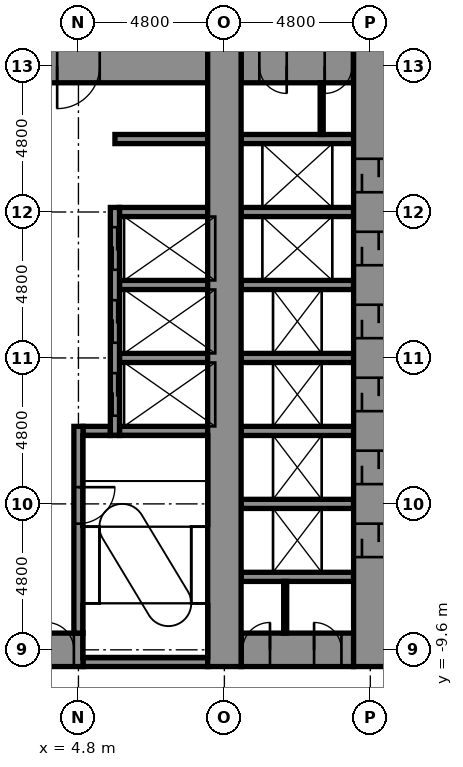
"""IFC4 building model, lengths in metres.
Left out: names, types, materials, properties, quantities, classifications, styles, units other than length and angle.
Written with IfcOpenShell. Run it as: python <this file> out.ifc"""

import sys

from ifc_helpers import new_model, si_unit, direction, frame, frame_2d, origin, place, context, subcontext, project, spatial, rectangle, extrude, element, fill, save


model = new_model("IFC4")
c1 = context("Model", 3, precision=1e-05, world=origin(), true_north=direction((0.0, 1.0)))
c2 = subcontext(c1, "Body", "Model", "MODEL_VIEW")
j1 = project(units=[si_unit("LENGTHUNIT", "METRE"), si_unit("PLANEANGLEUNIT", "RADIAN")], contexts=[c1])
p1 = place(None, origin())
s1 = spatial("IfcSite", under=j1, at=p1, CompositionType="ELEMENT")
p2 = place(p1, origin())
s2 = spatial("IfcBuilding", under=s1, at=p2, CompositionType="ELEMENT")
p3 = place(p2, origin())
s3 = spatial("IfcBuildingStorey", under=s2, at=p3, CompositionType="ELEMENT", Elevation=0.0)
p4 = place(p3, frame((4.95, -10.0, -0.4), z_axis=(0.0, 0.0, 1.0), x_axis=(1.0, 0.0, 0.0)))
e1 = element("IfcWall", 1, at=p4, inside=s3, PredefinedType="STANDARD", context=c2, shape_type="SweptSolid", body=[
    extrude(rectangle(XDim=4.1, YDim=0.3, at=frame_2d((2.05, 0.0))), origin(), (0.0, 0.0, 1.0), 7.1),
])
p5 = place(p3, frame((-5.25, -9.6, -0.4), z_axis=(0.0, 0.0, 1.0), x_axis=(1.0, 0.0, 0.0)))
e2 = element("IfcWall", 2, at=p5, inside=s3, PredefinedType="SHEAR", context=c2, shape_type="SweptSolid", body=[
    extrude(rectangle(XDim=10.2, YDim=1.1, at=frame_2d((5.1, 0.0))), origin(), (0.0, 0.0, 1.0), 7.1),
])
p6 = place(p5, frame((9.0, 0.0, 0.4)))
e3 = element("IfcOpeningElement", 3, at=p6, cuts=e2, PredefinedType="OPENING", context=c2, shape_type="SweptSolid", body=[
    extrude(rectangle(XDim=0.9, YDim=2.1, at=frame_2d((0.45, 1.05))), frame((0.0, 0.56, 0.0), z_axis=(0.0, -1.0, 0.0), x_axis=(1.0, 0.0, 0.0)), (0.0, 0.0, 1.0), 1.12),
])
p7 = place(p3, frame((10.15, -9.6, -0.4), z_axis=(0.0, 0.0, 1.0), x_axis=(1.0, 0.0, 0.0)))
e4 = element("IfcWall", 4, at=p7, inside=s3, PredefinedType="SHEAR", context=c2, shape_type="SweptSolid", body=[
    extrude(rectangle(XDim=3.7, YDim=1.1, at=frame_2d((1.85, 0.0))), origin(), (0.0, 0.0, 1.0), 7.1),
])
p8 = place(p7, frame((0.05, 0.0, 0.4)))
e5 = element("IfcOpeningElement", 5, at=p8, cuts=e4, PredefinedType="OPENING", context=c2, shape_type="SweptSolid", body=[
    extrude(rectangle(XDim=0.9, YDim=2.1, at=frame_2d((0.45, 1.05))), frame((0.0, 0.56, 0.0), z_axis=(0.0, -1.0, 0.0), x_axis=(1.0, 0.0, 0.0)), (0.0, 0.0, 1.0), 1.12),
])
p9 = place(p7, frame((2.4, 0.0, 0.4)))
e6 = element("IfcOpeningElement", 6, at=p9, cuts=e4, PredefinedType="OPENING", context=c2, shape_type="SweptSolid", body=[
    extrude(rectangle(XDim=0.9, YDim=2.1, at=frame_2d((0.45, 1.05))), frame((0.0, 0.56, 0.0), z_axis=(0.0, -1.0, 0.0), x_axis=(1.0, 0.0, 0.0)), (0.0, 0.0, 1.0), 1.12),
])
for number, where, z_axis, x_axis in (
    (7, (10.15, -7.2, -0.4), (0.0, 0.0, 1.0), (1.0, 0.0, 0.0)),
    (8, (10.15, -4.8, -0.4), (0.0, 0.0, 1.0), (1.0, 0.0, 0.0)),
):
    element("IfcWall", number, at=place(p3, frame(where, z_axis=z_axis, x_axis=x_axis)), inside=s3, PredefinedType="STANDARD", context=c2, shape_type="SweptSolid", body=[
        extrude(rectangle(XDim=3.7, YDim=0.3, at=frame_2d((1.85, 0.0))), origin(), (0.0, 0.0, 1.0), 7.1),
    ])
p10 = place(p3, frame((4.95, -2.4, -0.4), z_axis=(0.0, 0.0, 1.0), x_axis=(1.0, 0.0, 0.0)))
e9 = element("IfcWall", 9, at=p10, inside=s3, PredefinedType="STANDARD", context=c2, shape_type="SweptSolid", body=[
    extrude(rectangle(XDim=0.9, YDim=0.3, at=frame_2d((0.45, 0.0))), origin(), (0.0, 0.0, 1.0), 7.1),
])
p11 = place(p3, frame((6.15, -2.4, -0.4), z_axis=(0.0, 0.0, 1.0), x_axis=(1.0, 0.0, 0.0)))
e10 = element("IfcWall", 10, at=p11, inside=s3, PredefinedType="STANDARD", context=c2, shape_type="SweptSolid", body=[
    extrude(rectangle(XDim=2.9, YDim=0.3, at=frame_2d((1.45, 0.0))), origin(), (0.0, 0.0, 1.0), 7.1),
])
p12 = place(p3, frame((10.15, -2.4, -0.4), z_axis=(0.0, 0.0, 1.0), x_axis=(1.0, 0.0, 0.0)))
e11 = element("IfcWall", 11, at=p12, inside=s3, PredefinedType="STANDARD", context=c2, shape_type="SweptSolid", body=[
    extrude(rectangle(XDim=3.7, YDim=0.3, at=frame_2d((1.85, 0.0))), origin(), (0.0, 0.0, 1.0), 7.1),
])
p13 = place(p3, frame((6.15, 0.0, -0.4), z_axis=(0.0, 0.0, 1.0), x_axis=(1.0, 0.0, 0.0)))
e12 = element("IfcWall", 12, at=p13, inside=s3, PredefinedType="STANDARD", context=c2, shape_type="SweptSolid", body=[
    extrude(rectangle(XDim=2.9, YDim=0.3, at=frame_2d((1.45, 0.0))), origin(), (0.0, 0.0, 1.0), 7.1),
])
p14 = place(p3, frame((10.15, 0.0, -0.4), z_axis=(0.0, 0.0, 1.0), x_axis=(1.0, 0.0, 0.0)))
e13 = element("IfcWall", 13, at=p14, inside=s3, PredefinedType="STANDARD", context=c2, shape_type="SweptSolid", body=[
    extrude(rectangle(XDim=3.7, YDim=0.3, at=frame_2d((1.85, 0.0))), origin(), (0.0, 0.0, 1.0), 7.1),
])
p15 = place(p3, frame((6.15, 2.4, -0.4), z_axis=(0.0, 0.0, 1.0), x_axis=(1.0, 0.0, 0.0)))
e14 = element("IfcWall", 14, at=p15, inside=s3, PredefinedType="STANDARD", context=c2, shape_type="SweptSolid", body=[
    extrude(rectangle(XDim=2.9, YDim=0.3, at=frame_2d((1.45, 0.0))), origin(), (0.0, 0.0, 1.0), 7.1),
])
p16 = place(p3, frame((10.15, 2.4, -0.4), z_axis=(0.0, 0.0, 1.0), x_axis=(1.0, 0.0, 0.0)))
e15 = element("IfcWall", 15, at=p16, inside=s3, PredefinedType="STANDARD", context=c2, shape_type="SweptSolid", body=[
    extrude(rectangle(XDim=3.7, YDim=0.3, at=frame_2d((1.85, 0.0))), origin(), (0.0, 0.0, 1.0), 7.1),
])
p17 = place(p3, frame((6.15, 4.8, -0.4), z_axis=(0.0, 0.0, 1.0), x_axis=(1.0, 0.0, 0.0)))
e16 = element("IfcWall", 16, at=p17, inside=s3, PredefinedType="STANDARD", context=c2, shape_type="SweptSolid", body=[
    extrude(rectangle(XDim=2.9, YDim=0.3, at=frame_2d((1.45, 0.0))), origin(), (0.0, 0.0, 1.0), 7.1),
])
p18 = place(p3, frame((10.15, 4.8, -0.4), z_axis=(0.0, 0.0, 1.0), x_axis=(1.0, 0.0, 0.0)))
e17 = element("IfcWall", 17, at=p18, inside=s3, PredefinedType="STANDARD", context=c2, shape_type="SweptSolid", body=[
    extrude(rectangle(XDim=3.7, YDim=0.3, at=frame_2d((1.85, 0.0))), origin(), (0.0, 0.0, 1.0), 7.1),
])
p19 = place(p3, frame((6.0, 7.2, -0.4), z_axis=(0.0, 0.0, 1.0), x_axis=(1.0, 0.0, 0.0)))
e18 = element("IfcWall", 18, at=p19, inside=s3, PredefinedType="STANDARD", context=c2, shape_type="SweptSolid", body=[
    extrude(rectangle(XDim=3.05, YDim=0.3, at=frame_2d((1.525, 0.0))), origin(), (0.0, 0.0, 1.0), 7.1),
])
p20 = place(p3, frame((10.15, 7.2, -0.4), z_axis=(0.0, 0.0, 1.0), x_axis=(1.0, 0.0, 0.0)))
e19 = element("IfcWall", 19, at=p20, inside=s3, PredefinedType="STANDARD", context=c2, shape_type="SweptSolid", body=[
    extrude(rectangle(XDim=3.7, YDim=0.3, at=frame_2d((1.85, 0.0))), origin(), (0.0, 0.0, 1.0), 7.1),
])
p21 = place(p3, frame((-5.25, 9.6, -0.4), z_axis=(0.0, 0.0, 1.0), x_axis=(1.0, 0.0, 0.0)))
e20 = element("IfcWall", 20, at=p21, inside=s3, PredefinedType="SHEAR", context=c2, shape_type="SweptSolid", body=[
    extrude(rectangle(XDim=14.3, YDim=1.1, at=frame_2d((7.15, 0.0))), origin(), (0.0, 0.0, 1.0), 7.1),
])
p22 = place(p21, frame((9.35, 0.0, 0.4)))
e21 = element("IfcOpeningElement", 21, at=p22, cuts=e20, PredefinedType="OPENING", context=c2, shape_type="SweptSolid", body=[
    extrude(rectangle(XDim=1.4, YDim=2.1, at=frame_2d((0.7, 1.05))), frame((0.0, 0.56, 0.0), z_axis=(0.0, -1.0, 0.0), x_axis=(1.0, 0.0, 0.0)), (0.0, 0.0, 1.0), 1.12),
])
p23 = place(p3, frame((10.15, 9.6, -0.4), z_axis=(0.0, 0.0, 1.0), x_axis=(1.0, 0.0, 0.0)))
e22 = element("IfcWall", 22, at=p23, inside=s3, PredefinedType="SHEAR", context=c2, shape_type="SweptSolid", body=[
    extrude(rectangle(XDim=3.7, YDim=1.1, at=frame_2d((1.85, 0.0))), origin(), (0.0, 0.0, 1.0), 7.1),
])
p24 = place(p23, frame((0.6, 0.0, 0.4)))
e23 = element("IfcOpeningElement", 23, at=p24, cuts=e22, PredefinedType="OPENING", context=c2, shape_type="SweptSolid", body=[
    extrude(rectangle(XDim=0.9, YDim=2.1, at=frame_2d((0.45, 1.05))), frame((0.0, 0.56, 0.0), z_axis=(0.0, -1.0, 0.0), x_axis=(1.0, 0.0, 0.0)), (0.0, 0.0, 1.0), 1.12),
])
p25 = place(p23, frame((2.75, 0.0, 0.4)))
e24 = element("IfcOpeningElement", 24, at=p25, cuts=e22, PredefinedType="OPENING", context=c2, shape_type="SweptSolid", body=[
    extrude(rectangle(XDim=0.9, YDim=2.1, at=frame_2d((0.45, 1.05))), frame((0.0, 0.56, 0.0), z_axis=(0.0, -1.0, 0.0), x_axis=(1.0, 0.0, 0.0)), (0.0, 0.0, 1.0), 1.12),
])
p26 = place(p3, frame((4.8, -9.05, -0.4), z_axis=(0.0, 0.0, 1.0), x_axis=(0.0, 1.0, 0.0)))
e25 = element("IfcWall", 25, at=p26, inside=s3, PredefinedType="STANDARD", context=c2, shape_type="SweptSolid", body=[
    extrude(rectangle(XDim=6.8, YDim=0.3, at=frame_2d((3.4, 0.0))), origin(), (0.0, 0.0, 1.0), 7.1),
])
p27 = place(p26, frame((3.6, 0.0, 0.4)))
e26 = element("IfcOpeningElement", 26, at=p27, cuts=e25, PredefinedType="OPENING", context=c2, shape_type="SweptSolid", body=[
    extrude(rectangle(XDim=1.2, YDim=2.1, at=frame_2d((0.6, 1.05))), frame((0.0, 0.16, 0.0), z_axis=(0.0, -1.0, 0.0), x_axis=(1.0, 0.0, 0.0)), (0.0, 0.0, 1.0), 0.32),
])
p28 = place(p3, frame((6.0, -2.55, -0.4), z_axis=(0.0, 0.0, 1.0), x_axis=(0.0, 1.0, 0.0)))
e27 = element("IfcWall", 27, at=p28, inside=s3, PredefinedType="STANDARD", context=c2, shape_type="SweptSolid", body=[
    extrude(rectangle(XDim=7.5, YDim=0.3, at=frame_2d((3.75, 0.0))), origin(), (0.0, 0.0, 1.0), 7.1),
])
p29 = place(p28, frame((0.65, 0.0, 0.4)))
e28 = element("IfcOpeningElement", 28, at=p29, cuts=e27, PredefinedType="OPENING", context=c2, shape_type="SweptSolid", body=[
    extrude(rectangle(XDim=1.4, YDim=2.1, at=frame_2d((0.7, 1.05))), frame((0.0, 0.16, 0.0), z_axis=(0.0, -1.0, 0.0), x_axis=(1.0, 0.0, 0.0)), (0.0, 0.0, 1.0), 0.32),
])
p30 = place(p28, frame((3.05, 0.0, 0.4)))
e29 = element("IfcOpeningElement", 29, at=p30, cuts=e27, PredefinedType="OPENING", context=c2, shape_type="SweptSolid", body=[
    extrude(rectangle(XDim=1.4, YDim=2.1, at=frame_2d((0.7, 1.05))), frame((0.0, 0.16, 0.0), z_axis=(0.0, -1.0, 0.0), x_axis=(1.0, 0.0, 0.0)), (0.0, 0.0, 1.0), 0.32),
])
p31 = place(p28, frame((5.45, 0.0, 0.4)))
e30 = element("IfcOpeningElement", 30, at=p31, cuts=e27, PredefinedType="OPENING", context=c2, shape_type="SweptSolid", body=[
    extrude(rectangle(XDim=1.4, YDim=2.1, at=frame_2d((0.7, 1.05))), frame((0.0, 0.16, 0.0), z_axis=(0.0, -1.0, 0.0), x_axis=(1.0, 0.0, 0.0)), (0.0, 0.0, 1.0), 0.32),
])
p32 = place(p3, frame((9.6, -10.15, -0.4), z_axis=(0.0, 0.0, 1.0), x_axis=(0.0, 1.0, 0.0)))
e31 = element("IfcWall", 31, at=p32, inside=s3, PredefinedType="SHEAR", context=c2, shape_type="SweptSolid", body=[
    extrude(rectangle(XDim=20.3, YDim=1.1, at=frame_2d((10.15, 0.0))), origin(), (0.0, 0.0, 1.0), 7.1),
])
p33 = place(p3, frame((14.4, -10.15, -0.4), z_axis=(0.0, 0.0, 1.0), x_axis=(0.0, 1.0, 0.0)))
e32 = element("IfcWall", 32, at=p33, inside=s3, PredefinedType="SHEAR", context=c2, shape_type="SweptSolid", body=[
    extrude(rectangle(XDim=20.3, YDim=1.1, at=frame_2d((10.15, 0.0))), origin(), (0.0, 0.0, 1.0), 7.1),
])
p34 = place(p33, frame((3.6, 0.0, 0.4)))
e33 = element("IfcOpeningElement", 33, at=p34, cuts=e32, PredefinedType="OPENING", context=c2, shape_type="SweptSolid", body=[
    extrude(rectangle(XDim=1.1, YDim=2.1, at=frame_2d((0.55, 1.05))), frame((0.0, 0.56, 0.0), z_axis=(0.0, -1.0, 0.0), x_axis=(1.0, 0.0, 0.0)), (0.0, 0.0, 1.0), 1.12),
])
p35 = place(p33, frame((6.0, 0.0, 0.4)))
e34 = element("IfcOpeningElement", 34, at=p35, cuts=e32, PredefinedType="OPENING", context=c2, shape_type="SweptSolid", body=[
    extrude(rectangle(XDim=1.1, YDim=2.1, at=frame_2d((0.55, 1.05))), frame((0.0, 0.56, 0.0), z_axis=(0.0, -1.0, 0.0), x_axis=(1.0, 0.0, 0.0)), (0.0, 0.0, 1.0), 1.12),
])
p36 = place(p33, frame((8.4, 0.0, 0.4)))
e35 = element("IfcOpeningElement", 35, at=p36, cuts=e32, PredefinedType="OPENING", context=c2, shape_type="SweptSolid", body=[
    extrude(rectangle(XDim=1.1, YDim=2.1, at=frame_2d((0.55, 1.05))), frame((0.0, 0.56, 0.0), z_axis=(0.0, -1.0, 0.0), x_axis=(1.0, 0.0, 0.0)), (0.0, 0.0, 1.0), 1.12),
])
p37 = place(p33, frame((10.8, 0.0, 0.4)))
e36 = element("IfcOpeningElement", 36, at=p37, cuts=e32, PredefinedType="OPENING", context=c2, shape_type="SweptSolid", body=[
    extrude(rectangle(XDim=1.1, YDim=2.1, at=frame_2d((0.55, 1.05))), frame((0.0, 0.56, 0.0), z_axis=(0.0, -1.0, 0.0), x_axis=(1.0, 0.0, 0.0)), (0.0, 0.0, 1.0), 1.12),
])
p38 = place(p33, frame((13.2, 0.0, 0.4)))
e37 = element("IfcOpeningElement", 37, at=p38, cuts=e32, PredefinedType="OPENING", context=c2, shape_type="SweptSolid", body=[
    extrude(rectangle(XDim=1.1, YDim=2.1, at=frame_2d((0.55, 1.05))), frame((0.0, 0.56, 0.0), z_axis=(0.0, -1.0, 0.0), x_axis=(1.0, 0.0, 0.0)), (0.0, 0.0, 1.0), 1.12),
])
p39 = place(p33, frame((15.6, 0.0, 0.4)))
e38 = element("IfcOpeningElement", 38, at=p39, cuts=e32, PredefinedType="OPENING", context=c2, shape_type="SweptSolid", body=[
    extrude(rectangle(XDim=1.1, YDim=2.1, at=frame_2d((0.55, 1.05))), frame((0.0, 0.56, 0.0), z_axis=(0.0, -1.0, 0.0), x_axis=(1.0, 0.0, 0.0)), (0.0, 0.0, 1.0), 1.12),
])
for number, where, z_axis, x_axis in (
    (39, (12.8, 7.35, 0.0), (0.0, 0.0, 1.0), (0.0, 1.0, 0.0)),
    (40, (11.6, -9.05, 0.0), (0.0, 0.0, 1.0), (0.0, 1.0, 0.0)),
):
    element("IfcWall", number, at=place(p3, frame(where, z_axis=z_axis, x_axis=x_axis)), inside=s3, PredefinedType="PARTITIONING", context=c2, shape_type="SweptSolid", body=[
        extrude(rectangle(XDim=1.7, YDim=0.1, at=frame_2d((0.85, 0.0))), origin(), (0.0, 0.0, 1.0), 6.7),
    ])
p40 = place(p29, origin())
e41 = element("IfcDoor", 41, at=p40, inside=s3, OperationType="DOUBLE_DOOR_SLIDING", PredefinedType="DOOR", context=c2, shape_type="SweptSolid", body=[
    extrude(rectangle(XDim=1.4, YDim=2.1, at=frame_2d((0.7, 1.05))), frame((0.0, 0.025, 0.0), z_axis=(0.0, -1.0, 0.0), x_axis=(1.0, 0.0, 0.0)), (0.0, 0.0, 1.0), 0.05),
])
fill(e28, e41)
p41 = place(p30, origin())
e42 = element("IfcDoor", 42, at=p41, inside=s3, OperationType="DOUBLE_DOOR_SLIDING", PredefinedType="DOOR", context=c2, shape_type="SweptSolid", body=[
    extrude(rectangle(XDim=1.4, YDim=2.1, at=frame_2d((0.7, 1.05))), frame((0.0, 0.025, 0.0), z_axis=(0.0, -1.0, 0.0), x_axis=(1.0, 0.0, 0.0)), (0.0, 0.0, 1.0), 0.05),
])
fill(e29, e42)
p42 = place(p31, origin())
e43 = element("IfcDoor", 43, at=p42, inside=s3, OperationType="DOUBLE_DOOR_SLIDING", PredefinedType="DOOR", context=c2, shape_type="SweptSolid", body=[
    extrude(rectangle(XDim=1.4, YDim=2.1, at=frame_2d((0.7, 1.05))), frame((0.0, 0.025, 0.0), z_axis=(0.0, -1.0, 0.0), x_axis=(1.0, 0.0, 0.0)), (0.0, 0.0, 1.0), 0.05),
])
fill(e30, e43)
p43 = place(p34, origin())
e44 = element("IfcDoor", 44, at=p43, inside=s3, OperationType="DOUBLE_DOOR_SLIDING", PredefinedType="DOOR", context=c2, shape_type="SweptSolid", body=[
    extrude(rectangle(XDim=1.1, YDim=2.1, at=frame_2d((0.55, 1.05))), frame((0.0, 0.025, 0.0), z_axis=(0.0, -1.0, 0.0), x_axis=(1.0, 0.0, 0.0)), (0.0, 0.0, 1.0), 0.05),
])
fill(e33, e44)
p44 = place(p35, origin())
e45 = element("IfcDoor", 45, at=p44, inside=s3, OperationType="DOUBLE_DOOR_SLIDING", PredefinedType="DOOR", context=c2, shape_type="SweptSolid", body=[
    extrude(rectangle(XDim=1.1, YDim=2.1, at=frame_2d((0.55, 1.05))), frame((0.0, 0.025, 0.0), z_axis=(0.0, -1.0, 0.0), x_axis=(1.0, 0.0, 0.0)), (0.0, 0.0, 1.0), 0.05),
])
fill(e34, e45)
p45 = place(p36, origin())
e46 = element("IfcDoor", 46, at=p45, inside=s3, OperationType="DOUBLE_DOOR_SLIDING", PredefinedType="DOOR", context=c2, shape_type="SweptSolid", body=[
    extrude(rectangle(XDim=1.1, YDim=2.1, at=frame_2d((0.55, 1.05))), frame((0.0, 0.025, 0.0), z_axis=(0.0, -1.0, 0.0), x_axis=(1.0, 0.0, 0.0)), (0.0, 0.0, 1.0), 0.05),
])
fill(e35, e46)
p46 = place(p37, origin())
e47 = element("IfcDoor", 47, at=p46, inside=s3, OperationType="DOUBLE_DOOR_SLIDING", PredefinedType="DOOR", context=c2, shape_type="SweptSolid", body=[
    extrude(rectangle(XDim=1.1, YDim=2.1, at=frame_2d((0.55, 1.05))), frame((0.0, 0.025, 0.0), z_axis=(0.0, -1.0, 0.0), x_axis=(1.0, 0.0, 0.0)), (0.0, 0.0, 1.0), 0.05),
])
fill(e36, e47)
p47 = place(p38, origin())
e48 = element("IfcDoor", 48, at=p47, inside=s3, OperationType="DOUBLE_DOOR_SLIDING", PredefinedType="DOOR", context=c2, shape_type="SweptSolid", body=[
    extrude(rectangle(XDim=1.1, YDim=2.1, at=frame_2d((0.55, 1.05))), frame((0.0, 0.025, 0.0), z_axis=(0.0, -1.0, 0.0), x_axis=(1.0, 0.0, 0.0)), (0.0, 0.0, 1.0), 0.05),
])
fill(e37, e48)
p48 = place(p39, origin())
e49 = element("IfcDoor", 49, at=p48, inside=s3, OperationType="DOUBLE_DOOR_SLIDING", PredefinedType="DOOR", context=c2, shape_type="SweptSolid", body=[
    extrude(rectangle(XDim=1.1, YDim=2.1, at=frame_2d((0.55, 1.05))), frame((0.0, 0.025, 0.0), z_axis=(0.0, -1.0, 0.0), x_axis=(1.0, 0.0, 0.0)), (0.0, 0.0, 1.0), 0.05),
])
fill(e38, e49)
p49 = place(p27, frame((1.2, 0.0, 0.0), z_axis=(0.0, 0.0, 1.0), x_axis=(-1.0, 0.0, 0.0)))
e50 = element("IfcDoor", 50, at=p49, inside=s3, OperationType="SINGLE_SWING_RIGHT", PredefinedType="DOOR", context=c2, shape_type="SweptSolid", body=[
    extrude(rectangle(XDim=1.2, YDim=2.1, at=frame_2d((0.6, 1.05))), frame((0.0, 0.025, 0.0), z_axis=(0.0, -1.0, 0.0), x_axis=(1.0, 0.0, 0.0)), (0.0, 0.0, 1.0), 0.05),
])
fill(e26, e50)
p50 = place(p8, origin())
e51 = element("IfcDoor", 51, at=p50, inside=s3, OperationType="SINGLE_SWING_RIGHT", PredefinedType="DOOR", context=c2, shape_type="SweptSolid", body=[
    extrude(rectangle(XDim=0.9, YDim=2.1, at=frame_2d((0.45, 1.05))), frame((0.0, 0.025, 0.0), z_axis=(0.0, -1.0, 0.0), x_axis=(1.0, 0.0, 0.0)), (0.0, 0.0, 1.0), 0.05),
])
fill(e5, e51)
p51 = place(p9, origin())
e52 = element("IfcDoor", 52, at=p51, inside=s3, OperationType="SINGLE_SWING_LEFT", PredefinedType="DOOR", context=c2, shape_type="SweptSolid", body=[
    extrude(rectangle(XDim=0.9, YDim=2.1, at=frame_2d((0.45, 1.05))), frame((0.0, 0.025, 0.0), z_axis=(0.0, -1.0, 0.0), x_axis=(1.0, 0.0, 0.0)), (0.0, 0.0, 1.0), 0.05),
])
fill(e6, e52)
p52 = place(p24, frame((0.9, 0.0, 0.0), z_axis=(0.0, 0.0, 1.0), x_axis=(-1.0, 0.0, 0.0)))
e53 = element("IfcDoor", 53, at=p52, inside=s3, OperationType="SINGLE_SWING_RIGHT", PredefinedType="DOOR", context=c2, shape_type="SweptSolid", body=[
    extrude(rectangle(XDim=0.9, YDim=2.1, at=frame_2d((0.45, 1.05))), frame((0.0, 0.025, 0.0), z_axis=(0.0, -1.0, 0.0), x_axis=(1.0, 0.0, 0.0)), (0.0, 0.0, 1.0), 0.05),
])
fill(e23, e53)
p53 = place(p25, frame((0.9, 0.0, 0.0), z_axis=(0.0, 0.0, 1.0), x_axis=(-1.0, 0.0, 0.0)))
e54 = element("IfcDoor", 54, at=p53, inside=s3, OperationType="SINGLE_SWING_LEFT", PredefinedType="DOOR", context=c2, shape_type="SweptSolid", body=[
    extrude(rectangle(XDim=0.9, YDim=2.1, at=frame_2d((0.45, 1.05))), frame((0.0, 0.025, 0.0), z_axis=(0.0, -1.0, 0.0), x_axis=(1.0, 0.0, 0.0)), (0.0, 0.0, 1.0), 0.05),
])
fill(e24, e54)
p54 = place(p22, frame((1.4, 0.0, 0.0), z_axis=(0.0, 0.0, 1.0), x_axis=(-1.0, 0.0, 0.0)))
e55 = element("IfcDoor", 55, at=p54, inside=s3, OperationType="SINGLE_SWING_LEFT", PredefinedType="DOOR", context=c2, shape_type="SweptSolid", body=[
    extrude(rectangle(XDim=1.4, YDim=2.1, at=frame_2d((0.7, 1.05))), frame((0.0, 0.025, 0.0), z_axis=(0.0, -1.0, 0.0), x_axis=(1.0, 0.0, 0.0)), (0.0, 0.0, 1.0), 0.05),
])
fill(e21, e55)
p55 = place(p6, origin())
e56 = element("IfcDoor", 56, at=p55, inside=s3, OperationType="SINGLE_SWING_LEFT", PredefinedType="DOOR", context=c2, shape_type="SweptSolid", body=[
    extrude(rectangle(XDim=0.9, YDim=2.1, at=frame_2d((0.45, 1.05))), frame((0.0, 0.025, 0.0), z_axis=(0.0, -1.0, 0.0), x_axis=(1.0, 0.0, 0.0)), (0.0, 0.0, 1.0), 0.05),
])
fill(e3, e56)
save(model, sys.argv[1])
